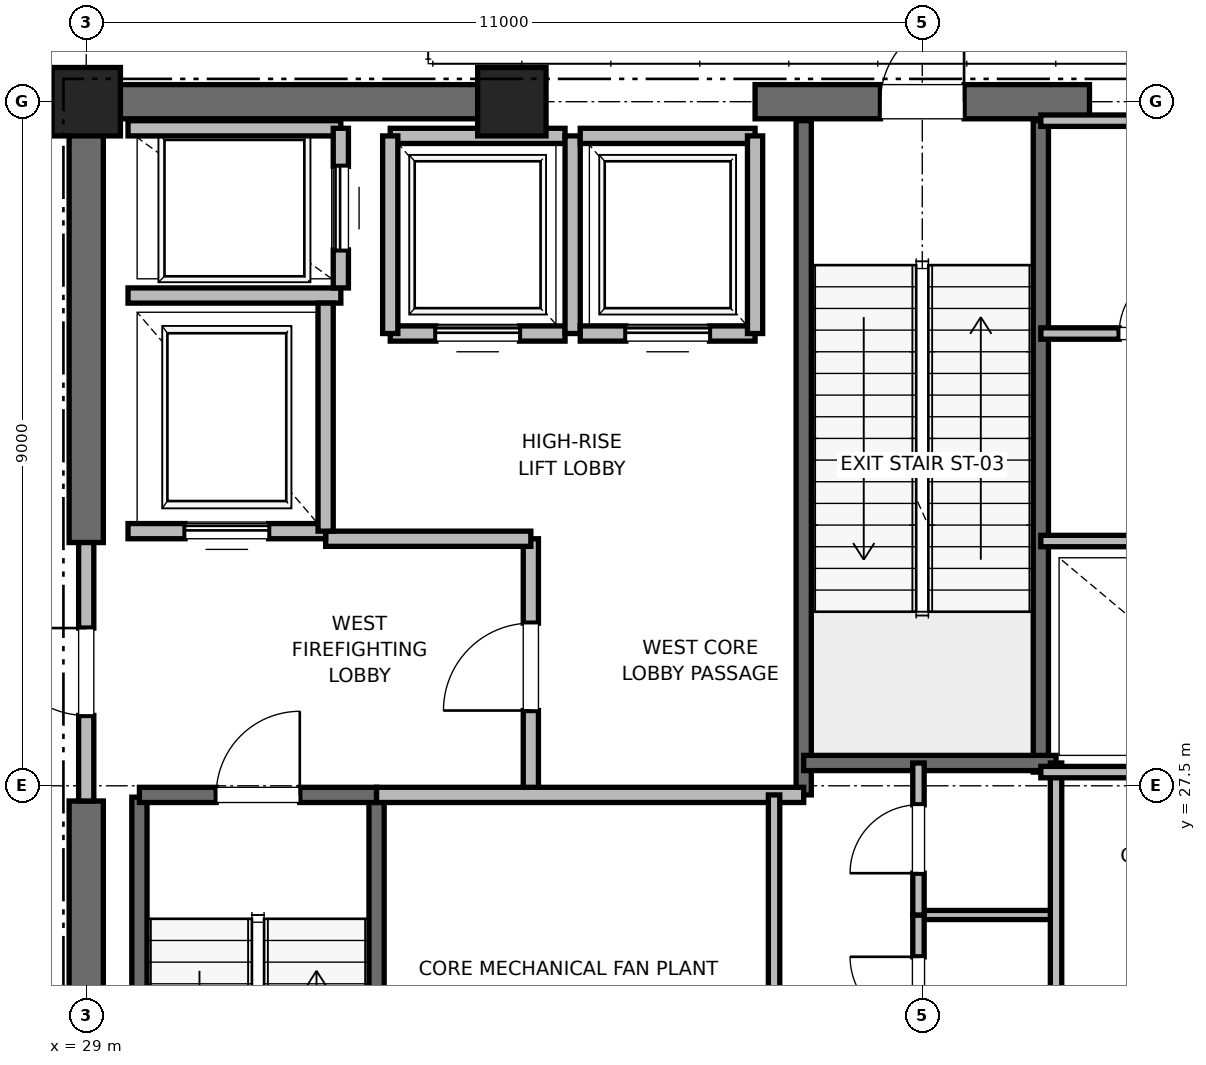
"""IFC4 building model, lengths in metres.
Left out: names, types, materials, properties, quantities, classifications, styles, units other than length and angle.
Written with IfcOpenShell. Run it as: python <this file> out.ifc"""

import sys

from ifc_helpers import new_model, si_unit, direction, frame, frame_2d, origin, origin_2d, place, context, subcontext, project, spatial, rectangle, extrude, element, fill, save


model = new_model("IFC4")
c1 = context("Model", 3, precision=1e-05, world=origin(), true_north=direction((0.0, 1.0)))
c2 = subcontext(c1, "Body", "Model", "MODEL_VIEW")
j1 = project(units=[si_unit("LENGTHUNIT", "METRE"), si_unit("PLANEANGLEUNIT", "RADIAN")], contexts=[c1])
p1 = place(None, origin())
s1 = spatial("IfcSite", under=j1, at=p1, CompositionType="ELEMENT")
p2 = place(p1, origin())
s2 = spatial("IfcBuilding", under=s1, at=p2, CompositionType="ELEMENT")
p3 = place(p2, frame((0.0, 0.0, 301.0)))
s3 = spatial("IfcBuildingStorey", under=s2, at=p3, CompositionType="ELEMENT", Elevation=301.0)
for number, where, z_axis, x_axis in (
    (1, (29.0, 36.5, 0.0), (0.0, 0.0, 1.0), (1.0, 0.0, 0.0)),
    (2, (34.6, 36.5, 0.0), (0.0, 0.0, 1.0), (1.0, 0.0, 0.0)),
):
    element("IfcColumn", number, at=place(p3, frame(where, z_axis=z_axis, x_axis=x_axis)), inside=s3, PredefinedType="PILASTER", context=c2, shape_type="SweptSolid", body=[
        extrude(rectangle(XDim=0.9, YDim=0.9, at=origin_2d()), origin(), (0.0, 0.0, 1.0), 5.8),
    ])
p4 = place(p3, frame((29.0, 36.5, 0.0), z_axis=(0.0, 0.0, 1.0), x_axis=(1.0, 0.0, 0.0)))
e3 = element("IfcWall", 3, at=p4, inside=s3, PredefinedType="SHEAR", context=c2, shape_type="SweptSolid", body=[
    extrude(rectangle(XDim=5.8, YDim=0.45, at=frame_2d((2.9, 0.0))), origin(), (0.0, 0.0, 1.0), 5.585),
])
p5 = place(p3, frame((37.8, 36.5, 0.0), z_axis=(0.0, 0.0, 1.0), x_axis=(1.0, 0.0, 0.0)))
e4 = element("IfcWall", 4, at=p5, inside=s3, PredefinedType="SHEAR", context=c2, shape_type="SweptSolid", body=[
    extrude(rectangle(XDim=4.4, YDim=0.45, at=frame_2d((2.2, 0.0))), origin(), (0.0, 0.0, 1.0), 5.585),
])
p6 = place(p5, frame((1.65, 0.0, 0.0)))
e5 = element("IfcOpeningElement", 5, at=p6, cuts=e4, PredefinedType="OPENING", context=c2, shape_type="SweptSolid", body=[
    extrude(rectangle(XDim=1.1, YDim=2.15, at=frame_2d((0.55, 1.075))), frame((0.0, 0.225, 0.0), z_axis=(0.0, -1.0, 0.0), x_axis=(1.0, 0.0, 0.0)), (0.0, 0.0, 1.0), 0.45),
])
p7 = place(p3, frame((29.0, 18.5, 0.0), z_axis=(0.0, 0.0, 1.0), x_axis=(0.0, 1.0, 0.0)))
e6 = element("IfcWall", 6, at=p7, inside=s3, PredefinedType="SHEAR", context=c2, shape_type="SweptSolid", body=[
    extrude(rectangle(XDim=8.8, YDim=0.45, at=frame_2d((4.4, 0.0))), origin(), (0.0, 0.0, 1.0), 5.585),
])
p8 = place(p3, frame((29.0, 30.7, 0.0), z_axis=(0.0, 0.0, 1.0), x_axis=(0.0, 1.0, 0.0)))
e7 = element("IfcWall", 7, at=p8, inside=s3, PredefinedType="SHEAR", context=c2, shape_type="SweptSolid", body=[
    extrude(rectangle(XDim=5.8, YDim=0.45, at=frame_2d((2.9, 0.0))), origin(), (0.0, 0.0, 1.0), 5.585),
])
p9 = place(p3, frame((29.7, 19.2, 0.0), z_axis=(0.0, 0.0, 1.0), x_axis=(0.0, 1.0, 0.0)))
e8 = element("IfcWall", 8, at=p9, inside=s3, PredefinedType="SOLIDWALL", context=c2, shape_type="SweptSolid", body=[
    extrude(rectangle(XDim=8.15, YDim=0.2, at=frame_2d((4.075, 0.0))), origin(), (0.0, 0.0, 1.0), 5.585),
])
p10 = place(p3, frame((32.82, 18.6, 0.0), z_axis=(0.0, 0.0, 1.0), x_axis=(0.0, 1.0, 0.0)))
e9 = element("IfcWall", 9, at=p10, inside=s3, PredefinedType="SOLIDWALL", context=c2, shape_type="SweptSolid", body=[
    extrude(rectangle(XDim=8.78, YDim=0.2, at=frame_2d((4.39, 0.0))), origin(), (0.0, 0.0, 1.0), 5.585),
])
p11 = place(p3, frame((29.7, 27.38, 0.0), z_axis=(0.0, 0.0, 1.0), x_axis=(1.0, 0.0, 0.0)))
e10 = element("IfcWall", 10, at=p11, inside=s3, PredefinedType="SOLIDWALL", context=c2, shape_type="SweptSolid", body=[
    extrude(rectangle(XDim=3.12, YDim=0.2, at=frame_2d((1.56, 0.0))), origin(), (0.0, 0.0, 1.0), 5.585),
])
p12 = place(p11, frame((1.01, 0.0, 0.0)))
e11 = element("IfcOpeningElement", 11, at=p12, cuts=e10, PredefinedType="OPENING", context=c2, shape_type="SweptSolid", body=[
    extrude(rectangle(XDim=1.1, YDim=2.15, at=frame_2d((0.55, 1.075))), frame((0.0, 0.1, 0.0), z_axis=(0.0, -1.0, 0.0), x_axis=(1.0, 0.0, 0.0)), (0.0, 0.0, 1.0), 0.2),
])
p13 = place(p3, frame((38.44, 27.38, 0.0), z_axis=(0.0, 0.0, 1.0), x_axis=(0.0, 1.0, 0.0)))
e12 = element("IfcWall", 12, at=p13, inside=s3, PredefinedType="SOLIDWALL", context=c2, shape_type="SweptSolid", body=[
    extrude(rectangle(XDim=8.87, YDim=0.2, at=frame_2d((4.435, 0.0))), origin(), (0.0, 0.0, 1.0), 5.585),
])
p14 = place(p3, frame((41.56, 27.68, 0.0), z_axis=(0.0, 0.0, 1.0), x_axis=(0.0, 1.0, 0.0)))
e13 = element("IfcWall", 13, at=p14, inside=s3, PredefinedType="SOLIDWALL", context=c2, shape_type="SweptSolid", body=[
    extrude(rectangle(XDim=8.57, YDim=0.2, at=frame_2d((4.285, 0.0))), origin(), (0.0, 0.0, 1.0), 5.585),
])
p15 = place(p3, frame((38.44, 27.8, 0.0), z_axis=(0.0, 0.0, 1.0), x_axis=(1.0, 0.0, 0.0)))
e14 = element("IfcWall", 14, at=p15, inside=s3, PredefinedType="SOLIDWALL", context=c2, shape_type="SweptSolid", body=[
    extrude(rectangle(XDim=3.32, YDim=0.2, at=frame_2d((1.66, 0.0))), origin(), (0.0, 0.0, 1.0), 5.585),
])
p16 = place(p3, frame((34.85, 27.38, 0.0), z_axis=(0.0, 0.0, 1.0), x_axis=(0.0, 1.0, 0.0)))
e15 = element("IfcWall", 15, at=p16, inside=s3, PredefinedType="PARTITIONING", context=c2, shape_type="SweptSolid", body=[
    extrude(rectangle(XDim=3.37, YDim=0.2, at=frame_2d((1.685, 0.0))), origin(), (0.0, 0.0, 1.0), 5.585),
])
p17 = place(p16, frame((1.11, 0.0, 0.0)))
e16 = element("IfcOpeningElement", 16, at=p17, cuts=e15, PredefinedType="OPENING", context=c2, shape_type="SweptSolid", body=[
    extrude(rectangle(XDim=1.15, YDim=2.2, at=frame_2d((0.575, 1.1))), frame((0.0, 0.1, 0.0), z_axis=(0.0, -1.0, 0.0), x_axis=(1.0, 0.0, 0.0)), (0.0, 0.0, 1.0), 0.2),
])
p18 = place(p3, frame((29.0, 27.3, 0.0), z_axis=(0.0, 0.0, 1.0), x_axis=(0.0, 1.0, 0.0)))
e17 = element("IfcWall", 17, at=p18, inside=s3, PredefinedType="PARTITIONING", context=c2, shape_type="SweptSolid", body=[
    extrude(rectangle(XDim=3.4, YDim=0.2, at=frame_2d((1.7, 0.0))), origin(), (0.0, 0.0, 1.0), 4.665),
])
p19 = place(p18, frame((1.125, 0.0, 0.0)))
e18 = element("IfcOpeningElement", 18, at=p19, cuts=e17, PredefinedType="OPENING", context=c2, shape_type="SweptSolid", body=[
    extrude(rectangle(XDim=1.15, YDim=2.2, at=frame_2d((0.575, 1.1))), frame((0.0, 0.1, 0.0), z_axis=(0.0, -1.0, 0.0), x_axis=(1.0, 0.0, 0.0)), (0.0, 0.0, 1.0), 0.2),
])
p20 = place(p3, frame((32.82, 27.38, 0.0), z_axis=(0.0, 0.0, 1.0), x_axis=(1.0, 0.0, 0.0)))
e19 = element("IfcWall", 19, at=p20, inside=s3, PredefinedType="PARTITIONING", context=c2, shape_type="SweptSolid", body=[
    extrude(rectangle(XDim=5.62, YDim=0.2, at=frame_2d((2.81, 0.0))), origin(), (0.0, 0.0, 1.0), 5.585),
])
p21 = place(p3, frame((32.15, 30.75, 0.0), z_axis=(0.0, 0.0, 1.0), x_axis=(1.0, 0.0, 0.0)))
e20 = element("IfcWall", 20, at=p21, inside=s3, PredefinedType="PARTITIONING", context=c2, shape_type="SweptSolid", body=[
    extrude(rectangle(XDim=2.7, YDim=0.2, at=frame_2d((1.35, 0.0))), origin(), (0.0, 0.0, 1.0), 5.585),
])
p22 = place(p3, frame((29.55, 30.85, 0.0), z_axis=(0.0, 0.0, 1.0), x_axis=(1.0, 0.0, 0.0)))
e21 = element("IfcWall", 21, at=p22, inside=s3, PredefinedType="SOLIDWALL", context=c2, shape_type="SweptSolid", body=[
    extrude(rectangle(XDim=2.6, YDim=0.2, at=frame_2d((1.3, 0.0))), origin(), (0.0, 0.0, 1.0), 4.665),
])
p23 = place(p22, frame((0.75, 0.0, 0.0)))
e22 = element("IfcOpeningElement", 22, at=p23, cuts=e21, PredefinedType="OPENING", context=c2, shape_type="SweptSolid", body=[
    extrude(rectangle(XDim=1.1, YDim=2.2, at=frame_2d((0.55, 1.1))), frame((0.0, 0.1, 0.0), z_axis=(0.0, -1.0, 0.0), x_axis=(1.0, 0.0, 0.0)), (0.0, 0.0, 1.0), 0.2),
])
p24 = place(p3, frame((29.55, 33.95, 0.0), z_axis=(0.0, 0.0, 1.0), x_axis=(1.0, 0.0, 0.0)))
e23 = element("IfcWall", 23, at=p24, inside=s3, PredefinedType="SOLIDWALL", context=c2, shape_type="SweptSolid", body=[
    extrude(rectangle(XDim=2.8, YDim=0.2, at=frame_2d((1.4, 0.0))), origin(), (0.0, 0.0, 1.0), 5.585),
])
p25 = place(p3, frame((32.15, 30.85, 0.0), z_axis=(0.0, 0.0, 1.0), x_axis=(0.0, 1.0, 0.0)))
e24 = element("IfcWall", 24, at=p25, inside=s3, PredefinedType="SOLIDWALL", context=c2, shape_type="SweptSolid", body=[
    extrude(rectangle(XDim=3.0, YDim=0.2, at=frame_2d((1.5, 0.0))), origin(), (0.0, 0.0, 1.0), 5.585),
])
p26 = place(p3, frame((32.35, 36.15, 0.0), z_axis=(0.0, 0.0, 1.0), x_axis=(-1.0, 0.0, 0.0)))
e25 = element("IfcWall", 25, at=p26, inside=s3, PredefinedType="SOLIDWALL", context=c2, shape_type="SweptSolid", body=[
    extrude(rectangle(XDim=2.8, YDim=0.2, at=frame_2d((1.4, 0.0))), origin(), (0.0, 0.0, 1.0), 4.638),
])
p27 = place(p3, frame((32.35, 34.05, 0.0), z_axis=(0.0, 0.0, 1.0), x_axis=(0.0, 1.0, 0.0)))
e26 = element("IfcWall", 26, at=p27, inside=s3, PredefinedType="SOLIDWALL", context=c2, shape_type="SweptSolid", body=[
    extrude(rectangle(XDim=2.1, YDim=0.2, at=frame_2d((1.05, 0.0))), origin(), (0.0, 0.0, 1.0), 5.585),
])
p28 = place(p27, frame((0.5, 0.0, 0.0)))
e27 = element("IfcOpeningElement", 27, at=p28, cuts=e26, PredefinedType="OPENING", context=c2, shape_type="SweptSolid", body=[
    extrude(rectangle(XDim=1.1, YDim=2.2, at=frame_2d((0.55, 1.1))), frame((0.0, 0.1, 0.0), z_axis=(0.0, -1.0, 0.0), x_axis=(1.0, 0.0, 0.0)), (0.0, 0.0, 1.0), 0.2),
])
p29 = place(p3, frame((33.0, 33.45, 0.0), z_axis=(0.0, 0.0, 1.0), x_axis=(1.0, 0.0, 0.0)))
e28 = element("IfcWall", 28, at=p29, inside=s3, PredefinedType="SOLIDWALL", context=c2, shape_type="SweptSolid", body=[
    extrude(rectangle(XDim=2.3, YDim=0.2, at=frame_2d((1.15, 0.0))), origin(), (0.0, 0.0, 1.0), 5.585),
])
p30 = place(p29, frame((0.6, 0.0, 0.0)))
e29 = element("IfcOpeningElement", 29, at=p30, cuts=e28, PredefinedType="OPENING", context=c2, shape_type="SweptSolid", body=[
    extrude(rectangle(XDim=1.1, YDim=2.2, at=frame_2d((0.55, 1.1))), frame((0.0, 0.1, 0.0), z_axis=(0.0, -1.0, 0.0), x_axis=(1.0, 0.0, 0.0)), (0.0, 0.0, 1.0), 0.2),
])
p31 = place(p3, frame((35.3, 36.05, 0.0), z_axis=(0.0, 0.0, 1.0), x_axis=(-1.0, 0.0, 0.0)))
e30 = element("IfcWall", 30, at=p31, inside=s3, PredefinedType="SOLIDWALL", context=c2, shape_type="SweptSolid", body=[
    extrude(rectangle(XDim=2.3, YDim=0.2, at=frame_2d((1.15, 0.0))), origin(), (0.0, 0.0, 1.0), 4.665),
])
p32 = place(p3, frame((33.0, 36.05, 0.0), z_axis=(0.0, 0.0, 1.0), x_axis=(0.0, -1.0, 0.0)))
e31 = element("IfcWall", 31, at=p32, inside=s3, PredefinedType="SOLIDWALL", context=c2, shape_type="SweptSolid", body=[
    extrude(rectangle(XDim=2.6, YDim=0.2, at=frame_2d((1.3, 0.0))), origin(), (0.0, 0.0, 1.0), 5.585),
])
p33 = place(p3, frame((35.4, 33.45, 0.0), z_axis=(0.0, 0.0, 1.0), x_axis=(0.0, 1.0, 0.0)))
e32 = element("IfcWall", 32, at=p33, inside=s3, PredefinedType="SOLIDWALL", context=c2, shape_type="SweptSolid", body=[
    extrude(rectangle(XDim=2.6, YDim=0.2, at=frame_2d((1.3, 0.0))), origin(), (0.0, 0.0, 1.0), 4.665),
])
p34 = place(p3, frame((35.5, 33.45, 0.0), z_axis=(0.0, 0.0, 1.0), x_axis=(1.0, 0.0, 0.0)))
e33 = element("IfcWall", 33, at=p34, inside=s3, PredefinedType="SOLIDWALL", context=c2, shape_type="SweptSolid", body=[
    extrude(rectangle(XDim=2.3, YDim=0.2, at=frame_2d((1.15, 0.0))), origin(), (0.0, 0.0, 1.0), 5.585),
])
p35 = place(p34, frame((0.6, 0.0, 0.0)))
e34 = element("IfcOpeningElement", 34, at=p35, cuts=e33, PredefinedType="OPENING", context=c2, shape_type="SweptSolid", body=[
    extrude(rectangle(XDim=1.1, YDim=2.2, at=frame_2d((0.55, 1.1))), frame((0.0, 0.1, 0.0), z_axis=(0.0, -1.0, 0.0), x_axis=(1.0, 0.0, 0.0)), (0.0, 0.0, 1.0), 0.2),
])
p36 = place(p3, frame((37.8, 36.05, 0.0), z_axis=(0.0, 0.0, 1.0), x_axis=(-1.0, 0.0, 0.0)))
e35 = element("IfcWall", 35, at=p36, inside=s3, PredefinedType="SOLIDWALL", context=c2, shape_type="SweptSolid", body=[
    extrude(rectangle(XDim=2.3, YDim=0.2, at=frame_2d((1.15, 0.0))), origin(), (0.0, 0.0, 1.0), 4.665),
])
p37 = place(p3, frame((37.8, 33.45, 0.0), z_axis=(0.0, 0.0, 1.0), x_axis=(0.0, 1.0, 0.0)))
e36 = element("IfcWall", 36, at=p37, inside=s3, PredefinedType="SOLIDWALL", context=c2, shape_type="SweptSolid", body=[
    extrude(rectangle(XDim=2.6, YDim=0.2, at=frame_2d((1.3, 0.0))), origin(), (0.0, 0.0, 1.0), 4.665),
])
p38 = place(p3, frame((39.95, 25.8, 0.0), z_axis=(0.0, 0.0, 1.0), x_axis=(1.0, 0.0, 0.0)))
e37 = element("IfcWall", 37, at=p38, inside=s3, PredefinedType="PARTITIONING", context=c2, shape_type="SweptSolid", body=[
    extrude(rectangle(XDim=1.81, YDim=0.12, at=frame_2d((0.905, 0.0))), origin(), (0.0, 0.0, 1.0), 2.85),
])
p39 = place(p3, frame((41.76, 23.8, 0.0), z_axis=(0.0, 0.0, 1.0), x_axis=(0.0, 1.0, 0.0)))
e38 = element("IfcWall", 38, at=p39, inside=s3, PredefinedType="PARTITIONING", context=c2, shape_type="SweptSolid", body=[
    extrude(rectangle(XDim=4.0, YDim=0.15, at=frame_2d((2.0, 0.0))), origin(), (0.0, 0.0, 1.0), 2.85),
])
p40 = place(p3, frame((39.95, 23.8, 0.0), z_axis=(0.0, 0.0, 1.0), x_axis=(0.0, 1.0, 0.0)))
e39 = element("IfcWall", 39, at=p40, inside=s3, PredefinedType="PARTITIONING", context=c2, shape_type="SweptSolid", body=[
    extrude(rectangle(XDim=2.0, YDim=0.15, at=frame_2d((1.0, 0.0))), origin(), (0.0, 0.0, 1.0), 2.85),
])
p41 = place(p40, frame((0.55, 0.0, 0.0)))
e40 = element("IfcOpeningElement", 40, at=p41, cuts=e39, PredefinedType="OPENING", context=c2, shape_type="SweptSolid", body=[
    extrude(rectangle(XDim=0.9, YDim=2.1, at=frame_2d((0.45, 1.05))), frame((0.0, 0.075, 0.0), z_axis=(0.0, -1.0, 0.0), x_axis=(1.0, 0.0, 0.0)), (0.0, 0.0, 1.0), 0.15),
])
p42 = place(p3, frame((39.95, 25.8, 0.0), z_axis=(0.0, 0.0, 1.0), x_axis=(0.0, 1.0, 0.0)))
e41 = element("IfcWall", 41, at=p42, inside=s3, PredefinedType="PARTITIONING", context=c2, shape_type="SweptSolid", body=[
    extrude(rectangle(XDim=2.0, YDim=0.15, at=frame_2d((1.0, 0.0))), origin(), (0.0, 0.0, 1.0), 2.85),
])
p43 = place(p42, frame((0.55, 0.0, 0.0)))
e42 = element("IfcOpeningElement", 42, at=p43, cuts=e41, PredefinedType="OPENING", context=c2, shape_type="SweptSolid", body=[
    extrude(rectangle(XDim=0.9, YDim=2.1, at=frame_2d((0.45, 1.05))), frame((0.0, 0.075, 0.0), z_axis=(0.0, -1.0, 0.0), x_axis=(1.0, 0.0, 0.0)), (0.0, 0.0, 1.0), 0.15),
])
p44 = place(p3, frame((38.05, 18.6, 0.0), z_axis=(0.0, 0.0, 1.0), x_axis=(0.0, 1.0, 0.0)))
e43 = element("IfcWall", 43, at=p44, inside=s3, PredefinedType="PARTITIONING", context=c2, shape_type="SweptSolid", body=[
    extrude(rectangle(XDim=8.78, YDim=0.15, at=frame_2d((4.39, 0.0))), origin(), (0.0, 0.0, 1.0), 2.85),
])
p45 = place(p44, frame((3.95, 0.0, 0.0)))
e44 = element("IfcOpeningElement", 44, at=p45, cuts=e43, PredefinedType="OPENING", context=c2, shape_type="SweptSolid", body=[
    extrude(rectangle(XDim=0.88, YDim=2.1, at=frame_2d((0.44, 1.05))), frame((0.0, 0.075, 0.0), z_axis=(0.0, -1.0, 0.0), x_axis=(1.0, 0.0, 0.0)), (0.0, 0.0, 1.0), 0.15),
])
p46 = place(p3, frame((41.56, 27.68, 0.0), z_axis=(0.0, 0.0, 1.0), x_axis=(1.0, 0.0, 0.0)))
e45 = element("IfcWall", 45, at=p46, inside=s3, PredefinedType="PARTITIONING", context=c2, shape_type="SweptSolid", body=[
    extrude(rectangle(XDim=3.59, YDim=0.15, at=frame_2d((1.795, 0.0))), origin(), (0.0, 0.0, 1.0), 2.85),
])
p47 = place(p3, frame((41.56, 30.72, 0.0), z_axis=(0.0, 0.0, 1.0), x_axis=(1.0, 0.0, 0.0)))
e46 = element("IfcWall", 46, at=p47, inside=s3, PredefinedType="PARTITIONING", context=c2, shape_type="SweptSolid", body=[
    extrude(rectangle(XDim=3.59, YDim=0.15, at=frame_2d((1.795, 0.0))), origin(), (0.0, 0.0, 1.0), 2.85),
])
p48 = place(p47, frame((1.355, 0.0, 0.0)))
e47 = element("IfcOpeningElement", 47, at=p48, cuts=e46, PredefinedType="OPENING", context=c2, shape_type="SweptSolid", body=[
    extrude(rectangle(XDim=0.88, YDim=2.1, at=frame_2d((0.44, 1.05))), frame((0.0, 0.075, 0.0), z_axis=(0.0, -1.0, 0.0), x_axis=(1.0, 0.0, 0.0)), (0.0, 0.0, 1.0), 0.15),
])
p49 = place(p3, frame((41.56, 36.25, 0.0), z_axis=(0.0, 0.0, 1.0), x_axis=(1.0, 0.0, 0.0)))
e48 = element("IfcWall", 48, at=p49, inside=s3, PredefinedType="PARTITIONING", context=c2, shape_type="SweptSolid", body=[
    extrude(rectangle(XDim=2.94, YDim=0.15, at=frame_2d((1.47, 0.0))), origin(), (0.0, 0.0, 1.0), 2.85),
])
p50 = place(p3, frame((41.56, 33.45, 0.0), z_axis=(0.0, 0.0, 1.0), x_axis=(1.0, 0.0, 0.0)))
e49 = element("IfcWall", 49, at=p50, inside=s3, PredefinedType="PARTITIONING", context=c2, shape_type="SweptSolid", body=[
    extrude(rectangle(XDim=2.94, YDim=0.15, at=frame_2d((1.47, 0.0))), origin(), (0.0, 0.0, 1.0), 2.85),
])
p51 = place(p50, frame((1.03, 0.0, 0.0)))
e50 = element("IfcOpeningElement", 50, at=p51, cuts=e49, PredefinedType="OPENING", context=c2, shape_type="SweptSolid", body=[
    extrude(rectangle(XDim=0.88, YDim=2.1, at=frame_2d((0.44, 1.05))), frame((0.0, 0.075, 0.0), z_axis=(0.0, -1.0, 0.0), x_axis=(1.0, 0.0, 0.0)), (0.0, 0.0, 1.0), 0.15),
])
p52 = place(p12, origin())
e51 = element("IfcDoor", 51, at=p52, inside=s3, OperationType="SINGLE_SWING_RIGHT", PredefinedType="DOOR", context=c2, shape_type="SweptSolid", body=[
    extrude(rectangle(XDim=1.1, YDim=2.15, at=frame_2d((0.55, 1.075))), frame((0.0, 0.025, 0.0), z_axis=(0.0, -1.0, 0.0), x_axis=(1.0, 0.0, 0.0)), (0.0, 0.0, 1.0), 0.05),
])
fill(e11, e51)
p53 = place(p6, origin())
e52 = element("IfcDoor", 52, at=p53, inside=s3, OperationType="SINGLE_SWING_RIGHT", PredefinedType="DOOR", context=c2, shape_type="SweptSolid", body=[
    extrude(rectangle(XDim=1.1, YDim=2.15, at=frame_2d((0.55, 1.075))), frame((0.0, 0.025, 0.0), z_axis=(0.0, -1.0, 0.0), x_axis=(1.0, 0.0, 0.0)), (0.0, 0.0, 1.0), 0.05),
])
fill(e5, e52)
p54 = place(p17, origin())
e53 = element("IfcDoor", 53, at=p54, inside=s3, OperationType="SINGLE_SWING_LEFT", PredefinedType="DOOR", context=c2, shape_type="SweptSolid", body=[
    extrude(rectangle(XDim=1.15, YDim=2.2, at=frame_2d((0.575, 1.1))), frame((0.0, 0.025, 0.0), z_axis=(0.0, -1.0, 0.0), x_axis=(1.0, 0.0, 0.0)), (0.0, 0.0, 1.0), 0.05),
])
fill(e16, e53)
p55 = place(p19, origin())
e54 = element("IfcDoor", 54, at=p55, inside=s3, OperationType="SINGLE_SWING_RIGHT", PredefinedType="DOOR", context=c2, shape_type="SweptSolid", body=[
    extrude(rectangle(XDim=1.15, YDim=2.2, at=frame_2d((0.575, 1.1))), frame((0.0, 0.025, 0.0), z_axis=(0.0, -1.0, 0.0), x_axis=(1.0, 0.0, 0.0)), (0.0, 0.0, 1.0), 0.05),
])
fill(e18, e54)
p56 = place(p23, origin())
e55 = element("IfcDoor", 55, at=p56, inside=s3, OperationType="SLIDING_TO_RIGHT", PredefinedType="DOOR", context=c2, shape_type="SweptSolid", body=[
    extrude(rectangle(XDim=1.1, YDim=2.2, at=frame_2d((0.55, 1.1))), frame((0.0, 0.025, 0.0), z_axis=(0.0, -1.0, 0.0), x_axis=(1.0, 0.0, 0.0)), (0.0, 0.0, 1.0), 0.05),
])
fill(e22, e55)
p57 = place(p28, origin())
e56 = element("IfcDoor", 56, at=p57, inside=s3, OperationType="SLIDING_TO_RIGHT", PredefinedType="DOOR", context=c2, shape_type="SweptSolid", body=[
    extrude(rectangle(XDim=1.1, YDim=2.2, at=frame_2d((0.55, 1.1))), frame((0.0, 0.025, 0.0), z_axis=(0.0, -1.0, 0.0), x_axis=(1.0, 0.0, 0.0)), (0.0, 0.0, 1.0), 0.05),
])
fill(e27, e56)
p58 = place(p30, origin())
e57 = element("IfcDoor", 57, at=p58, inside=s3, OperationType="SLIDING_TO_RIGHT", PredefinedType="DOOR", context=c2, shape_type="SweptSolid", body=[
    extrude(rectangle(XDim=1.1, YDim=2.2, at=frame_2d((0.55, 1.1))), frame((0.0, 0.025, 0.0), z_axis=(0.0, -1.0, 0.0), x_axis=(1.0, 0.0, 0.0)), (0.0, 0.0, 1.0), 0.05),
])
fill(e29, e57)
p59 = place(p35, origin())
e58 = element("IfcDoor", 58, at=p59, inside=s3, OperationType="SLIDING_TO_RIGHT", PredefinedType="DOOR", context=c2, shape_type="SweptSolid", body=[
    extrude(rectangle(XDim=1.1, YDim=2.2, at=frame_2d((0.55, 1.1))), frame((0.0, 0.025, 0.0), z_axis=(0.0, -1.0, 0.0), x_axis=(1.0, 0.0, 0.0)), (0.0, 0.0, 1.0), 0.05),
])
fill(e34, e58)
p60 = place(p41, origin())
e59 = element("IfcDoor", 59, at=p60, inside=s3, OperationType="SINGLE_SWING_RIGHT", PredefinedType="DOOR", context=c2, shape_type="SweptSolid", body=[
    extrude(rectangle(XDim=0.9, YDim=2.1, at=frame_2d((0.45, 1.05))), frame((0.0, 0.025, 0.0), z_axis=(0.0, -1.0, 0.0), x_axis=(1.0, 0.0, 0.0)), (0.0, 0.0, 1.0), 0.05),
])
fill(e40, e59)
p61 = place(p43, origin())
e60 = element("IfcDoor", 60, at=p61, inside=s3, OperationType="SINGLE_SWING_LEFT", PredefinedType="DOOR", context=c2, shape_type="SweptSolid", body=[
    extrude(rectangle(XDim=0.9, YDim=2.1, at=frame_2d((0.45, 1.05))), frame((0.0, 0.025, 0.0), z_axis=(0.0, -1.0, 0.0), x_axis=(1.0, 0.0, 0.0)), (0.0, 0.0, 1.0), 0.05),
])
fill(e42, e60)
p62 = place(p51, origin())
e61 = element("IfcDoor", 61, at=p62, inside=s3, OperationType="SINGLE_SWING_RIGHT", PredefinedType="DOOR", context=c2, shape_type="SweptSolid", body=[
    extrude(rectangle(XDim=0.88, YDim=2.1, at=frame_2d((0.44, 1.05))), frame((0.0, 0.025, 0.0), z_axis=(0.0, -1.0, 0.0), x_axis=(1.0, 0.0, 0.0)), (0.0, 0.0, 1.0), 0.05),
])
fill(e50, e61)
save(model, sys.argv[1])
